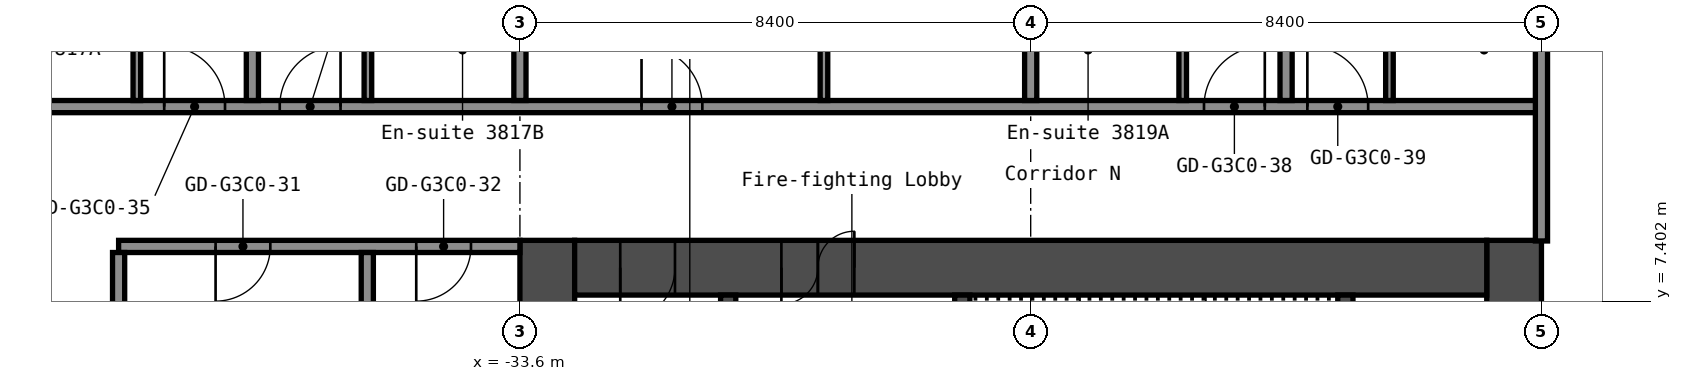
"""IFC4 building model, lengths in metres.
Left out: names, types, materials, properties, quantities, classifications, styles, units other than length and angle.
Written with IfcOpenShell. Run it as: python <this file> out.ifc"""

import sys

from ifc_helpers import new_model, si_unit, direction, frame, frame_2d, origin, place, context, subcontext, project, spatial, rectangle, extrude, element, fill, save


model = new_model("IFC4")
c1 = context("Model", 3, precision=1e-05, world=origin(), true_north=direction((0.0, 1.0)))
c2 = subcontext(c1, "Body", "Model", "MODEL_VIEW")
j1 = project(units=[si_unit("LENGTHUNIT", "METRE"), si_unit("PLANEANGLEUNIT", "RADIAN")], contexts=[c1])
p1 = place(None, origin())
s1 = spatial("IfcSite", under=j1, at=p1, CompositionType="ELEMENT")
p2 = place(p1, origin())
s2 = spatial("IfcBuilding", under=s1, at=p2, CompositionType="ELEMENT")
p3 = place(p2, frame((0.0, 0.0, 137.4)))
s3 = spatial("IfcBuildingStorey", under=s2, at=p3, CompositionType="ELEMENT", Elevation=137.4)
p4 = place(p3, frame((-17.25, -8.4, 0.0), z_axis=(0.0, 0.0, 1.0), x_axis=(0.0, 1.0, 0.0)))
e1 = element("IfcWall", 1, at=p4, inside=s3, PredefinedType="SHEAR", context=c2, shape_type="SweptSolid", body=[
    extrude(rectangle(XDim=16.8, YDim=0.9, at=frame_2d((8.4, 0.0))), origin(), (0.0, 0.0, 1.0), 2.75),
])
p5 = place(p4, frame((7.1, 0.0, 0.0)))
e2 = element("IfcOpeningElement", 2, at=p5, cuts=e1, PredefinedType="OPENING", context=c2, shape_type="SweptSolid", body=[
    extrude(rectangle(XDim=1.6, YDim=2.1, at=frame_2d((0.8, 1.05))), frame((0.0, 0.46, 0.0), z_axis=(0.0, -1.0, 0.0), x_axis=(1.0, 0.0, 0.0)), (0.0, 0.0, 1.0), 0.92),
])
p6 = place(p3, frame((-33.15, -8.4, 0.0), z_axis=(0.0, 0.0, 1.0), x_axis=(0.0, 1.0, 0.0)))
e3 = element("IfcWall", 3, at=p6, inside=s3, PredefinedType="SHEAR", context=c2, shape_type="SweptSolid", body=[
    extrude(rectangle(XDim=16.8, YDim=0.9, at=frame_2d((8.4, 0.0))), origin(), (0.0, 0.0, 1.0), 2.75),
])
p7 = place(p3, frame((-32.7, 7.95, 0.0), z_axis=(0.0, 0.0, 1.0), x_axis=(1.0, 0.0, 0.0)))
e4 = element("IfcWall", 4, at=p7, inside=s3, PredefinedType="SHEAR", context=c2, shape_type="SweptSolid", body=[
    extrude(rectangle(XDim=15.0, YDim=0.9, at=frame_2d((7.5, 0.0))), origin(), (0.0, 0.0, 1.0), 2.75),
])
p8 = place(p7, frame((3.4, 0.0, 0.0)))
e5 = element("IfcOpeningElement", 5, at=p8, cuts=e4, PredefinedType="OPENING", context=c2, shape_type="SweptSolid", body=[
    extrude(rectangle(XDim=1.2, YDim=2.1, at=frame_2d((0.6, 1.05))), frame((0.0, 0.46, 0.0), z_axis=(0.0, -1.0, 0.0), x_axis=(1.0, 0.0, 0.0)), (0.0, 0.0, 1.0), 0.92),
])
p9 = place(p7, frame((0.75, 0.0, 0.0)))
e6 = element("IfcOpeningElement", 6, at=p9, cuts=e4, PredefinedType="OPENING", context=c2, shape_type="SweptSolid", body=[
    extrude(rectangle(XDim=0.9, YDim=2.1, at=frame_2d((0.45, 1.05))), frame((0.0, 0.46, 0.0), z_axis=(0.0, -1.0, 0.0), x_axis=(1.0, 0.0, 0.0)), (0.0, 0.0, 1.0), 0.92),
])
p10 = place(p3, frame((-20.025, 1.2, 0.0), z_axis=(0.0, 0.0, 1.0), x_axis=(0.0, 1.0, 0.0)))
e7 = element("IfcWall", 7, at=p10, inside=s3, PredefinedType="SHEAR", context=c2, shape_type="SweptSolid", body=[
    extrude(rectangle(XDim=6.3, YDim=0.25, at=frame_2d((3.15, 0.0))), origin(), (0.0, 0.0, 1.0), 2.75),
])
p11 = place(p3, frame((-26.325, 3.75, 0.0), z_axis=(0.0, 0.0, 1.0), x_axis=(0.0, 1.0, 0.0)))
e8 = element("IfcWall", 8, at=p11, inside=s3, PredefinedType="SHEAR", context=c2, shape_type="SweptSolid", body=[
    extrude(rectangle(XDim=3.75, YDim=0.25, at=frame_2d((1.875, 0.0))), origin(), (0.0, 0.0, 1.0), 2.75),
])
p12 = place(p11, frame((1.25, 0.0, 0.0)))
e9 = element("IfcOpeningElement", 9, at=p12, cuts=e8, PredefinedType="OPENING", context=c2, shape_type="SweptSolid", body=[
    extrude(rectangle(XDim=1.2, YDim=2.1, at=frame_2d((0.6, 1.05))), frame((0.0, 0.135, 0.0), z_axis=(0.0, -1.0, 0.0), x_axis=(1.0, 0.0, 0.0)), (0.0, 0.0, 1.0), 0.27),
])
p13 = place(p3, frame((-30.175, 1.45, 0.0), z_axis=(0.0, 0.0, 1.0), x_axis=(0.0, 1.0, 0.0)))
e10 = element("IfcWall", 10, at=p13, inside=s3, PredefinedType="SHEAR", context=c2, shape_type="SweptSolid", body=[
    extrude(rectangle(XDim=6.05, YDim=0.25, at=frame_2d((3.025, 0.0))), origin(), (0.0, 0.0, 1.0), 2.75),
])
p14 = place(p13, frame((2.625, 0.0, 0.0)))
e11 = element("IfcOpeningElement", 11, at=p14, cuts=e10, PredefinedType="OPENING", context=c2, shape_type="SweptSolid", body=[
    extrude(rectangle(XDim=1.1, YDim=2.1, at=frame_2d((0.55, 1.05))), frame((0.0, 0.135, 0.0), z_axis=(0.0, -1.0, 0.0), x_axis=(1.0, 0.0, 0.0)), (0.0, 0.0, 1.0), 0.27),
])
p15 = place(p3, frame((-40.2, 8.3, 0.0), z_axis=(0.0, 0.0, 1.0), x_axis=(1.0, 0.0, 0.0)))
e12 = element("IfcWall", 12, at=p15, inside=s3, PredefinedType="PARTITIONING", context=c2, shape_type="SweptSolid", body=[
    extrude(rectangle(XDim=6.6, YDim=0.2, at=frame_2d((3.3, 0.0))), origin(), (0.0, 0.0, 1.0), 2.75),
])
p16 = place(p15, frame((1.595, 0.0, 0.0)))
e13 = element("IfcOpeningElement", 13, at=p16, cuts=e12, PredefinedType="OPENING", context=c2, shape_type="SweptSolid", body=[
    extrude(rectangle(XDim=0.9, YDim=2.1, at=frame_2d((0.45, 1.05))), frame((0.0, 0.11, 0.0), z_axis=(0.0, -1.0, 0.0), x_axis=(1.0, 0.0, 0.0)), (0.0, 0.0, 1.0), 0.22),
])
p17 = place(p15, frame((4.895, 0.0, 0.0)))
e14 = element("IfcOpeningElement", 14, at=p17, cuts=e12, PredefinedType="OPENING", context=c2, shape_type="SweptSolid", body=[
    extrude(rectangle(XDim=0.9, YDim=2.1, at=frame_2d((0.45, 1.05))), frame((0.0, 0.11, 0.0), z_axis=(0.0, -1.0, 0.0), x_axis=(1.0, 0.0, 0.0)), (0.0, 0.0, 1.0), 0.22),
])
p18 = place(p3, frame((-42.7, 10.6, 0.0), z_axis=(0.0, 0.0, 1.0), x_axis=(1.0, 0.0, 0.0)))
e15 = element("IfcWall", 15, at=p18, inside=s3, PredefinedType="PARTITIONING", context=c2, shape_type="SweptSolid", body=[
    extrude(rectangle(XDim=25.9, YDim=0.2, at=frame_2d((12.95, 0.0))), origin(), (0.0, 0.0, 1.0), 2.75),
])
p19 = place(p18, frame((3.25, 0.0, 0.0)))
e16 = element("IfcOpeningElement", 16, at=p19, cuts=e15, PredefinedType="OPENING", context=c2, shape_type="SweptSolid", body=[
    extrude(rectangle(XDim=1.0, YDim=2.1, at=frame_2d((0.5, 1.05))), frame((0.0, 0.11, 0.0), z_axis=(0.0, -1.0, 0.0), x_axis=(1.0, 0.0, 0.0)), (0.0, 0.0, 1.0), 0.22),
])
p20 = place(p18, frame((5.15, 0.0, 0.0)))
e17 = element("IfcOpeningElement", 17, at=p20, cuts=e15, PredefinedType="OPENING", context=c2, shape_type="SweptSolid", body=[
    extrude(rectangle(XDim=1.0, YDim=2.1, at=frame_2d((0.5, 1.05))), frame((0.0, 0.11, 0.0), z_axis=(0.0, -1.0, 0.0), x_axis=(1.0, 0.0, 0.0)), (0.0, 0.0, 1.0), 0.22),
])
p21 = place(p18, frame((11.1, 0.0, 0.0)))
e18 = element("IfcOpeningElement", 18, at=p21, cuts=e15, PredefinedType="OPENING", context=c2, shape_type="SweptSolid", body=[
    extrude(rectangle(XDim=1.0, YDim=2.1, at=frame_2d((0.5, 1.05))), frame((0.0, 0.11, 0.0), z_axis=(0.0, -1.0, 0.0), x_axis=(1.0, 0.0, 0.0)), (0.0, 0.0, 1.0), 0.22),
])
p22 = place(p18, frame((20.35, 0.0, 0.0)))
e19 = element("IfcOpeningElement", 19, at=p22, cuts=e15, PredefinedType="OPENING", context=c2, shape_type="SweptSolid", body=[
    extrude(rectangle(XDim=1.0, YDim=2.1, at=frame_2d((0.5, 1.05))), frame((0.0, 0.11, 0.0), z_axis=(0.0, -1.0, 0.0), x_axis=(1.0, 0.0, 0.0)), (0.0, 0.0, 1.0), 0.22),
])
p23 = place(p18, frame((22.05, 0.0, 0.0)))
e20 = element("IfcOpeningElement", 20, at=p23, cuts=e15, PredefinedType="OPENING", context=c2, shape_type="SweptSolid", body=[
    extrude(rectangle(XDim=1.0, YDim=2.1, at=frame_2d((0.5, 1.05))), frame((0.0, 0.11, 0.0), z_axis=(0.0, -1.0, 0.0), x_axis=(1.0, 0.0, 0.0)), (0.0, 0.0, 1.0), 0.22),
])
p24 = place(p3, frame((-40.2, -8.2, 0.0), z_axis=(0.0, 0.0, 1.0), x_axis=(0.0, 1.0, 0.0)))
e21 = element("IfcWall", 21, at=p24, inside=s3, PredefinedType="PARTITIONING", context=c2, shape_type="SweptSolid", body=[
    extrude(rectangle(XDim=16.4, YDim=0.2, at=frame_2d((8.2, 0.0))), origin(), (0.0, 0.0, 1.0), 2.75),
])
p25 = place(p3, frame((-39.9, 10.7, 0.0), z_axis=(0.0, 0.0, 1.0), x_axis=(0.0, 1.0, 0.0)))
e22 = element("IfcWall", 22, at=p25, inside=s3, PredefinedType="PARTITIONING", context=c2, shape_type="SweptSolid", body=[
    extrude(rectangle(XDim=2.9, YDim=0.125, at=frame_2d((1.45, 0.0))), origin(), (0.0, 0.0, 1.0), 2.75),
])
p26 = place(p25, frame((1.5, 0.0, 0.0)))
e23 = element("IfcOpeningElement", 23, at=p26, cuts=e22, PredefinedType="OPENING", context=c2, shape_type="SweptSolid", body=[
    extrude(rectangle(XDim=0.8, YDim=2.1, at=frame_2d((0.4, 1.05))), frame((0.0, 0.073, 0.0), z_axis=(0.0, -1.0, 0.0), x_axis=(1.0, 0.0, 0.0)), (0.0, 0.0, 1.0), 0.145),
])
p27 = place(p3, frame((-38.0, 10.7, 0.0), z_axis=(0.0, 0.0, 1.0), x_axis=(0.0, 1.0, 0.0)))
e24 = element("IfcWall", 24, at=p27, inside=s3, PredefinedType="PARTITIONING", context=c2, shape_type="SweptSolid", body=[
    extrude(rectangle(XDim=7.6, YDim=0.2, at=frame_2d((3.8, 0.0))), origin(), (0.0, 0.0, 1.0), 2.75),
])
p28 = place(p3, frame((-36.11, 0.0, 0.0), z_axis=(0.0, 0.0, 1.0), x_axis=(0.0, 1.0, 0.0)))
e25 = element("IfcWall", 25, at=p28, inside=s3, PredefinedType="PARTITIONING", context=c2, shape_type="SweptSolid", body=[
    extrude(rectangle(XDim=8.2, YDim=0.2, at=frame_2d((4.1, 0.0))), origin(), (0.0, 0.0, 1.0), 2.75),
])
p29 = place(p3, frame((-36.1, 10.7, 0.0), z_axis=(0.0, 0.0, 1.0), x_axis=(0.0, 1.0, 0.0)))
e26 = element("IfcWall", 26, at=p29, inside=s3, PredefinedType="PARTITIONING", context=c2, shape_type="SweptSolid", body=[
    extrude(rectangle(XDim=2.9, YDim=0.125, at=frame_2d((1.45, 0.0))), origin(), (0.0, 0.0, 1.0), 2.75),
])
p30 = place(p29, frame((1.5, 0.0, 0.0)))
e27 = element("IfcOpeningElement", 27, at=p30, cuts=e26, PredefinedType="OPENING", context=c2, shape_type="SweptSolid", body=[
    extrude(rectangle(XDim=0.8, YDim=2.1, at=frame_2d((0.4, 1.05))), frame((0.0, 0.073, 0.0), z_axis=(0.0, -1.0, 0.0), x_axis=(1.0, 0.0, 0.0)), (0.0, 0.0, 1.0), 0.145),
])
p31 = place(p3, frame((-33.6, 10.7, 0.0), z_axis=(0.0, 0.0, 1.0), x_axis=(0.0, 1.0, 0.0)))
e28 = element("IfcWall", 28, at=p31, inside=s3, PredefinedType="PARTITIONING", context=c2, shape_type="SweptSolid", body=[
    extrude(rectangle(XDim=7.6, YDim=0.2, at=frame_2d((3.8, 0.0))), origin(), (0.0, 0.0, 1.0), 2.75),
])
p32 = place(p3, frame((-28.6, 10.7, 0.0), z_axis=(0.0, 0.0, 1.0), x_axis=(0.0, 1.0, 0.0)))
e29 = element("IfcWall", 29, at=p32, inside=s3, PredefinedType="PARTITIONING", context=c2, shape_type="SweptSolid", body=[
    extrude(rectangle(XDim=3.3, YDim=0.125, at=frame_2d((1.65, 0.0))), origin(), (0.0, 0.0, 1.0), 2.75),
])
p33 = place(p3, frame((-25.2, 10.7, 0.0), z_axis=(0.0, 0.0, 1.0), x_axis=(0.0, 1.0, 0.0)))
e30 = element("IfcWall", 30, at=p33, inside=s3, PredefinedType="PARTITIONING", context=c2, shape_type="SweptSolid", body=[
    extrude(rectangle(XDim=7.6, YDim=0.2, at=frame_2d((3.8, 0.0))), origin(), (0.0, 0.0, 1.0), 2.75),
])
p34 = place(p3, frame((-22.7, 10.7, 0.0), z_axis=(0.0, 0.0, 1.0), x_axis=(0.0, 1.0, 0.0)))
e31 = element("IfcWall", 31, at=p34, inside=s3, PredefinedType="PARTITIONING", context=c2, shape_type="SweptSolid", body=[
    extrude(rectangle(XDim=2.9, YDim=0.125, at=frame_2d((1.45, 0.0))), origin(), (0.0, 0.0, 1.0), 2.75),
])
p35 = place(p34, frame((1.5, 0.0, 0.0)))
e32 = element("IfcOpeningElement", 32, at=p35, cuts=e31, PredefinedType="OPENING", context=c2, shape_type="SweptSolid", body=[
    extrude(rectangle(XDim=0.8, YDim=2.1, at=frame_2d((0.4, 1.05))), frame((0.0, 0.073, 0.0), z_axis=(0.0, -1.0, 0.0), x_axis=(1.0, 0.0, 0.0)), (0.0, 0.0, 1.0), 0.145),
])
p36 = place(p3, frame((-21.0, 10.7, 0.0), z_axis=(0.0, 0.0, 1.0), x_axis=(0.0, 1.0, 0.0)))
e33 = element("IfcWall", 33, at=p36, inside=s3, PredefinedType="PARTITIONING", context=c2, shape_type="SweptSolid", body=[
    extrude(rectangle(XDim=7.6, YDim=0.2, at=frame_2d((3.8, 0.0))), origin(), (0.0, 0.0, 1.0), 2.75),
])
p37 = place(p3, frame((-19.3, 10.7, 0.0), z_axis=(0.0, 0.0, 1.0), x_axis=(0.0, 1.0, 0.0)))
e34 = element("IfcWall", 34, at=p37, inside=s3, PredefinedType="PARTITIONING", context=c2, shape_type="SweptSolid", body=[
    extrude(rectangle(XDim=2.9, YDim=0.125, at=frame_2d((1.45, 0.0))), origin(), (0.0, 0.0, 1.0), 2.75),
])
p38 = place(p37, frame((1.5, 0.0, 0.0)))
e35 = element("IfcOpeningElement", 35, at=p38, cuts=e34, PredefinedType="OPENING", context=c2, shape_type="SweptSolid", body=[
    extrude(rectangle(XDim=0.8, YDim=2.1, at=frame_2d((0.4, 1.05))), frame((0.0, 0.073, 0.0), z_axis=(0.0, -1.0, 0.0), x_axis=(1.0, 0.0, 0.0)), (0.0, 0.0, 1.0), 0.145),
])
p39 = place(p3, frame((-16.8, 8.39, 0.0), z_axis=(0.0, 0.0, 1.0), x_axis=(0.0, 1.0, 0.0)))
e36 = element("IfcWall", 36, at=p39, inside=s3, PredefinedType="PARTITIONING", context=c2, shape_type="SweptSolid", body=[
    extrude(rectangle(XDim=9.91, YDim=0.2, at=frame_2d((4.955, 0.0))), origin(), (0.0, 0.0, 1.0), 2.75),
])
p40 = place(p8, origin())
e37 = element("IfcDoor", 37, at=p40, inside=s3, OperationType="DOUBLE_DOOR_SINGLE_SWING", PredefinedType="DOOR", context=c2, shape_type="SweptSolid", body=[
    extrude(rectangle(XDim=1.2, YDim=2.1, at=frame_2d((0.6, 1.05))), frame((0.0, 0.025, 0.0), z_axis=(0.0, -1.0, 0.0), x_axis=(1.0, 0.0, 0.0)), (0.0, 0.0, 1.0), 0.05),
])
fill(e5, e37)
p41 = place(p9, origin())
e38 = element("IfcDoor", 38, at=p41, inside=s3, OperationType="SINGLE_SWING_LEFT", PredefinedType="DOOR", context=c2, shape_type="SweptSolid", body=[
    extrude(rectangle(XDim=0.9, YDim=2.1, at=frame_2d((0.45, 1.05))), frame((0.0, 0.025, 0.0), z_axis=(0.0, -1.0, 0.0), x_axis=(1.0, 0.0, 0.0)), (0.0, 0.0, 1.0), 0.05),
])
fill(e6, e38)
p42 = place(p16, origin())
e39 = element("IfcDoor", 39, at=p42, inside=s3, OperationType="SINGLE_SWING_LEFT", PredefinedType="DOOR", context=c2, shape_type="SweptSolid", body=[
    extrude(rectangle(XDim=0.9, YDim=2.1, at=frame_2d((0.45, 1.05))), frame((0.0, 0.025, 0.0), z_axis=(0.0, -1.0, 0.0), x_axis=(1.0, 0.0, 0.0)), (0.0, 0.0, 1.0), 0.05),
])
fill(e13, e39)
p43 = place(p17, origin())
e40 = element("IfcDoor", 40, at=p43, inside=s3, OperationType="SINGLE_SWING_LEFT", PredefinedType="DOOR", context=c2, shape_type="SweptSolid", body=[
    extrude(rectangle(XDim=0.9, YDim=2.1, at=frame_2d((0.45, 1.05))), frame((0.0, 0.025, 0.0), z_axis=(0.0, -1.0, 0.0), x_axis=(1.0, 0.0, 0.0)), (0.0, 0.0, 1.0), 0.05),
])
fill(e14, e40)
p44 = place(p19, origin())
e41 = element("IfcDoor", 41, at=p44, inside=s3, OperationType="SINGLE_SWING_RIGHT", PredefinedType="DOOR", context=c2, shape_type="SweptSolid", body=[
    extrude(rectangle(XDim=1.0, YDim=2.1, at=frame_2d((0.5, 1.05))), frame((0.0, 0.025, 0.0), z_axis=(0.0, -1.0, 0.0), x_axis=(1.0, 0.0, 0.0)), (0.0, 0.0, 1.0), 0.05),
])
fill(e16, e41)
p45 = place(p20, origin())
e42 = element("IfcDoor", 42, at=p45, inside=s3, OperationType="SINGLE_SWING_LEFT", PredefinedType="DOOR", context=c2, shape_type="SweptSolid", body=[
    extrude(rectangle(XDim=1.0, YDim=2.1, at=frame_2d((0.5, 1.05))), frame((0.0, 0.025, 0.0), z_axis=(0.0, -1.0, 0.0), x_axis=(1.0, 0.0, 0.0)), (0.0, 0.0, 1.0), 0.05),
])
fill(e17, e42)
p46 = place(p21, origin())
e43 = element("IfcDoor", 43, at=p46, inside=s3, OperationType="SINGLE_SWING_RIGHT", PredefinedType="DOOR", context=c2, shape_type="SweptSolid", body=[
    extrude(rectangle(XDim=1.0, YDim=2.1, at=frame_2d((0.5, 1.05))), frame((0.0, 0.025, 0.0), z_axis=(0.0, -1.0, 0.0), x_axis=(1.0, 0.0, 0.0)), (0.0, 0.0, 1.0), 0.05),
])
fill(e18, e43)
p47 = place(p22, origin())
e44 = element("IfcDoor", 44, at=p47, inside=s3, OperationType="SINGLE_SWING_LEFT", PredefinedType="DOOR", context=c2, shape_type="SweptSolid", body=[
    extrude(rectangle(XDim=1.0, YDim=2.1, at=frame_2d((0.5, 1.05))), frame((0.0, 0.025, 0.0), z_axis=(0.0, -1.0, 0.0), x_axis=(1.0, 0.0, 0.0)), (0.0, 0.0, 1.0), 0.05),
])
fill(e19, e44)
p48 = place(p23, origin())
e45 = element("IfcDoor", 45, at=p48, inside=s3, OperationType="SINGLE_SWING_RIGHT", PredefinedType="DOOR", context=c2, shape_type="SweptSolid", body=[
    extrude(rectangle(XDim=1.0, YDim=2.1, at=frame_2d((0.5, 1.05))), frame((0.0, 0.025, 0.0), z_axis=(0.0, -1.0, 0.0), x_axis=(1.0, 0.0, 0.0)), (0.0, 0.0, 1.0), 0.05),
])
fill(e20, e45)
save(model, sys.argv[1])
